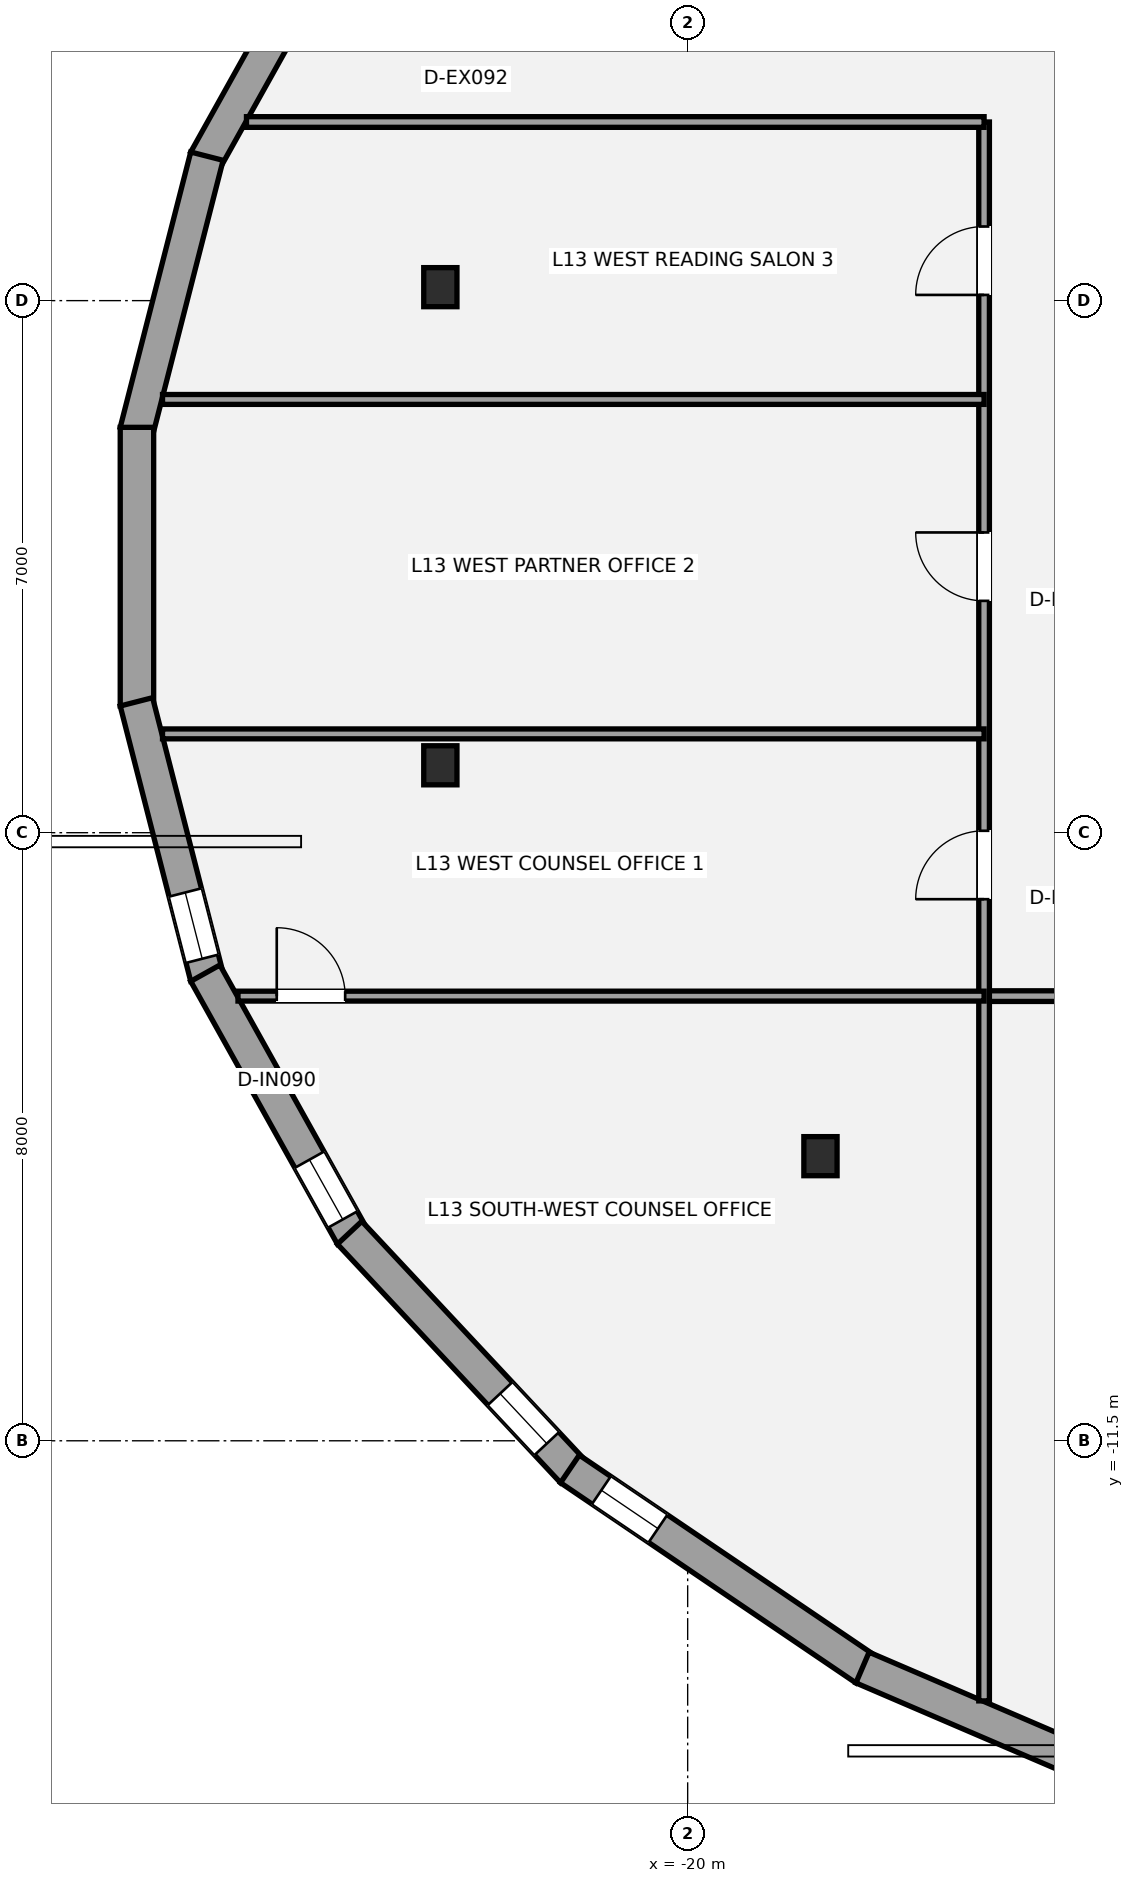
"""IFC4 building model, lengths in metres.
Left out: names, types, materials, properties, quantities, classifications, styles, units other than length and angle.
Written with IfcOpenShell. Run it as: python <this file> out.ifc"""

import sys

from ifc_helpers import new_model, si_unit, direction, frame, frame_2d, origin, origin_2d, place, context, subcontext, project, spatial, rectangle, i_section, extrude, element, fill, save


model = new_model("IFC4")
c1 = context("Model", 3, precision=1e-05, world=origin(), true_north=direction((0.0, 1.0)))
c2 = subcontext(c1, "Body", "Model", "MODEL_VIEW")
j1 = project(units=[si_unit("LENGTHUNIT", "METRE"), si_unit("PLANEANGLEUNIT", "RADIAN")], contexts=[c1])
p1 = place(None, origin())
s1 = spatial("IfcSite", under=j1, at=p1, CompositionType="ELEMENT")
p2 = place(p1, origin())
s2 = spatial("IfcBuilding", under=s1, at=p2, CompositionType="ELEMENT")
p3 = place(p2, frame((0.0, 0.0, 52.2)))
s3 = spatial("IfcBuildingStorey", under=s2, at=p3, CompositionType="ELEMENT", Elevation=52.2)
for number, where, z_axis, x_axis in (
    (1, (-23.254, 3.677, 0.0), (0.0, 0.0, 1.0), (1.0, 0.0, 0.0)),
    (2, (-23.254, -2.613, 0.0), (0.0, 0.0, 1.0), (1.0, 0.0, 0.0)),
    (3, (-18.253, -7.756, 0.0), (0.0, 0.0, 1.0), (1.0, 0.0, 0.0)),
):
    element("IfcColumn", number, at=place(p3, frame(where, z_axis=z_axis, x_axis=x_axis)), inside=s3, PredefinedType="COLUMN", context=c2, shape_type="SweptSolid", body=[
        extrude(i_section(OverallWidth=0.437, OverallDepth=0.514, WebThickness=0.061, FlangeThickness=0.097, at=origin_2d()), origin(), (0.0, 0.0, 1.0), 3.6),
    ])
p4 = place(p3, frame((-26.346, 5.348, 0.0), z_axis=(0.0, 0.0, 1.0), x_axis=(0.487369438963, 0.873195871477, 0.0)))
e4 = element("IfcWall", 4, at=p4, inside=s3, PredefinedType="STANDARD", context=c2, shape_type="SweptSolid", body=[
    extrude(rectangle(XDim=3.96, YDim=0.44, at=frame_2d((1.98, 0.0))), origin(), (0.0, 0.0, 1.0), 2.533),
])
p5 = place(p4, frame((2.761, 0.0, 0.58)))
e5 = element("IfcOpeningElement", 5, at=p5, cuts=e4, PredefinedType="OPENING", context=c2, shape_type="SweptSolid", body=[
    extrude(rectangle(XDim=0.9, YDim=1.35, at=frame_2d((0.45, 0.675))), frame((0.0, 0.23, 0.0), z_axis=(0.0, -1.0, 0.0), x_axis=(1.0, 0.0, 0.0)), (0.0, 0.0, 1.0), 0.46),
])
p6 = place(p3, frame((-27.253, 1.778, 0.0), z_axis=(0.0, 0.0, 1.0), x_axis=(0.248062710061, 0.968743976434, 0.0)))
e6 = element("IfcWall", 6, at=p6, inside=s3, PredefinedType="STANDARD", context=c2, shape_type="SweptSolid", body=[
    extrude(rectangle(XDim=3.739, YDim=0.44, at=frame_2d((1.87, 0.0))), origin(), (0.0, 0.0, 1.0), 2.533),
])
p7 = place(p3, frame((-27.246, -1.833, 0.0), z_axis=(0.0, 0.0, 1.0), x_axis=(0.0, 1.0, 0.0)))
e7 = element("IfcWall", 7, at=p7, inside=s3, PredefinedType="STANDARD", context=c2, shape_type="SweptSolid", body=[
    extrude(rectangle(XDim=3.666, YDim=0.44, at=frame_2d((1.833, 0.0))), origin(), (0.0, 0.0, 1.0), 2.533),
])
p8 = place(p3, frame((-26.325, -5.4, 0.0), z_axis=(0.0, 0.0, 1.0), x_axis=(-0.248062710061, 0.968743976434, 0.0)))
e8 = element("IfcWall", 8, at=p8, inside=s3, PredefinedType="STANDARD", context=c2, shape_type="SweptSolid", body=[
    extrude(rectangle(XDim=3.739, YDim=0.44, at=frame_2d((1.87, 0.0))), origin(), (0.0, 0.0, 1.0), 2.533),
])
p9 = place(p8, frame((0.25, 0.0, 0.42)))
e9 = element("IfcOpeningElement", 9, at=p9, cuts=e8, PredefinedType="OPENING", context=c2, shape_type="SweptSolid", body=[
    extrude(rectangle(XDim=0.9, YDim=1.35, at=frame_2d((0.45, 0.675))), frame((0.0, 0.23, 0.0), z_axis=(0.0, -1.0, 0.0), x_axis=(1.0, 0.0, 0.0)), (0.0, 0.0, 1.0), 0.46),
])
p10 = place(p3, frame((-24.416, -8.806, 0.0), z_axis=(0.0, 0.0, 1.0), x_axis=(-0.487369438963, 0.873195871477, 0.0)))
e10 = element("IfcWall", 10, at=p10, inside=s3, PredefinedType="STANDARD", context=c2, shape_type="SweptSolid", body=[
    extrude(rectangle(XDim=3.96, YDim=0.44, at=frame_2d((1.98, 0.0))), origin(), (0.0, 0.0, 1.0), 2.533),
])
p11 = place(p10, frame((0.249, 0.0, 0.92)))
e11 = element("IfcOpeningElement", 11, at=p11, cuts=e10, PredefinedType="OPENING", context=c2, shape_type="SweptSolid", body=[
    extrude(rectangle(XDim=0.9, YDim=1.35, at=frame_2d((0.45, 0.675))), frame((0.0, 0.23, 0.0), z_axis=(0.0, -1.0, 0.0), x_axis=(1.0, 0.0, 0.0)), (0.0, 0.0, 1.0), 0.46),
])
p12 = place(p3, frame((-21.512, -11.902, 0.0), z_axis=(0.0, 0.0, 1.0), x_axis=(-0.68299392258, 0.730424056093, 0.0)))
e12 = element("IfcWall", 12, at=p12, inside=s3, PredefinedType="STANDARD", context=c2, shape_type="SweptSolid", body=[
    extrude(rectangle(XDim=4.298, YDim=0.44, at=frame_2d((2.149, 0.0))), origin(), (0.0, 0.0, 1.0), 2.533),
])
p13 = place(p12, frame((0.5, 0.0, 0.58)))
e13 = element("IfcOpeningElement", 13, at=p13, cuts=e12, PredefinedType="OPENING", context=c2, shape_type="SweptSolid", body=[
    extrude(rectangle(XDim=0.9, YDim=1.35, at=frame_2d((0.45, 0.675))), frame((0.0, 0.23, 0.0), z_axis=(0.0, -1.0, 0.0), x_axis=(1.0, 0.0, 0.0)), (0.0, 0.0, 1.0), 0.46),
])
p14 = place(p3, frame((-17.663, -14.504, 0.0), z_axis=(0.0, 0.0, 1.0), x_axis=(-0.827825981515, 0.560984976919, 0.0)))
e14 = element("IfcWall", 14, at=p14, inside=s3, PredefinedType="STANDARD", context=c2, shape_type="SweptSolid", body=[
    extrude(rectangle(XDim=4.695, YDim=0.44, at=frame_2d((2.347, 0.0))), origin(), (0.0, 0.0, 1.0), 2.533),
])
p15 = place(p14, frame((3.295, 0.0, 0.58)))
e15 = element("IfcOpeningElement", 15, at=p15, cuts=e14, PredefinedType="OPENING", context=c2, shape_type="SweptSolid", body=[
    extrude(rectangle(XDim=0.9, YDim=1.35, at=frame_2d((0.45, 0.675))), frame((0.0, 0.23, 0.0), z_axis=(0.0, -1.0, 0.0), x_axis=(1.0, 0.0, 0.0)), (0.0, 0.0, 1.0), 0.46),
])
p16 = place(p3, frame((-13.067, -16.473, 0.0), z_axis=(0.0, 0.0, 1.0), x_axis=(-0.918881850071, 0.394532819433, 0.0)))
e16 = element("IfcWall", 16, at=p16, inside=s3, PredefinedType="STANDARD", context=c2, shape_type="SweptSolid", body=[
    extrude(rectangle(XDim=5.042, YDim=0.44, at=frame_2d((2.521, 0.0))), origin(), (0.0, 0.0, 1.0), 2.533),
])
p17 = place(p16, frame((0.2, 0.0, 0.58)))
e17 = element("IfcOpeningElement", 17, at=p17, cuts=e16, PredefinedType="OPENING", context=c2, shape_type="SweptSolid", body=[
    extrude(rectangle(XDim=1.4, YDim=1.55, at=frame_2d((0.7, 0.775))), frame((0.0, 0.23, 0.0), z_axis=(0.0, -1.0, 0.0), x_axis=(1.0, 0.0, 0.0)), (0.0, 0.0, 1.0), 0.46),
])
p18 = place(p3, frame((-16.1, -5.65, 0.0), z_axis=(0.0, 0.0, 1.0), x_axis=(1.0, 0.0, 0.0)))
e18 = element("IfcWall", 18, at=p18, inside=s3, PredefinedType="PARTITIONING", context=c2, shape_type="SweptSolid", body=[
    extrude(rectangle(XDim=34.1, YDim=0.14, at=frame_2d((17.05, 0.0))), origin(), (0.0, 0.0, 1.0), 3.4),
])
p19 = place(p18, frame((5.35, 0.0, 0.0)))
e19 = element("IfcOpeningElement", 19, at=p19, cuts=e18, PredefinedType="OPENING", context=c2, shape_type="SweptSolid", body=[
    extrude(rectangle(XDim=0.9, YDim=2.1, at=frame_2d((0.45, 1.05))), frame((0.0, 0.08, 0.0), z_axis=(0.0, -1.0, 0.0), x_axis=(1.0, 0.0, 0.0)), (0.0, 0.0, 1.0), 0.16),
])
p20 = place(p18, frame((15.85, 0.0, 0.0)))
e20 = element("IfcOpeningElement", 20, at=p20, cuts=e18, PredefinedType="OPENING", context=c2, shape_type="SweptSolid", body=[
    extrude(rectangle(XDim=1.5, YDim=2.15, at=frame_2d((0.75, 1.075))), frame((0.0, 0.08, 0.0), z_axis=(0.0, -1.0, 0.0), x_axis=(1.0, 0.0, 0.0)), (0.0, 0.0, 1.0), 0.16),
])
p21 = place(p18, frame((27.4, 0.0, 0.0)))
e21 = element("IfcOpeningElement", 21, at=p21, cuts=e18, PredefinedType="OPENING", context=c2, shape_type="SweptSolid", body=[
    extrude(rectangle(XDim=0.9, YDim=2.1, at=frame_2d((0.45, 1.05))), frame((0.0, 0.08, 0.0), z_axis=(0.0, -1.0, 0.0), x_axis=(1.0, 0.0, 0.0)), (0.0, 0.0, 1.0), 0.16),
])
p22 = place(p3, frame((-16.1, -14.922, 0.0), z_axis=(0.0, 0.0, 1.0), x_axis=(0.0, 1.0, 0.0)))
e22 = element("IfcWall", 22, at=p22, inside=s3, PredefinedType="PARTITIONING", context=c2, shape_type="SweptSolid", body=[
    extrude(rectangle(XDim=20.772, YDim=0.14, at=frame_2d((10.386, 0.0))), origin(), (0.0, 0.0, 1.0), 2.841),
])
p23 = place(p22, frame((10.547, 0.0, 0.0)))
e23 = element("IfcOpeningElement", 23, at=p23, cuts=e22, PredefinedType="OPENING", context=c2, shape_type="SweptSolid", body=[
    extrude(rectangle(XDim=0.9, YDim=2.1, at=frame_2d((0.45, 1.05))), frame((0.0, 0.08, 0.0), z_axis=(0.0, -1.0, 0.0), x_axis=(1.0, 0.0, 0.0)), (0.0, 0.0, 1.0), 0.16),
])
p24 = place(p22, frame((14.472, 0.0, 0.0)))
e24 = element("IfcOpeningElement", 24, at=p24, cuts=e22, PredefinedType="OPENING", context=c2, shape_type="SweptSolid", body=[
    extrude(rectangle(XDim=0.9, YDim=2.1, at=frame_2d((0.45, 1.05))), frame((0.0, 0.08, 0.0), z_axis=(0.0, -1.0, 0.0), x_axis=(1.0, 0.0, 0.0)), (0.0, 0.0, 1.0), 0.16),
])
p25 = place(p22, frame((18.497, 0.0, 0.0)))
e25 = element("IfcOpeningElement", 25, at=p25, cuts=e22, PredefinedType="OPENING", context=c2, shape_type="SweptSolid", body=[
    extrude(rectangle(XDim=0.9, YDim=2.1, at=frame_2d((0.45, 1.05))), frame((0.0, 0.08, 0.0), z_axis=(0.0, -1.0, 0.0), x_axis=(1.0, 0.0, 0.0)), (0.0, 0.0, 1.0), 0.16),
])
p26 = place(p3, frame((-25.805, 5.85, 0.0), z_axis=(0.0, 0.0, 1.0), x_axis=(1.0, 0.0, 0.0)))
e26 = element("IfcWall", 26, at=p26, inside=s3, PredefinedType="PARTITIONING", context=c2, shape_type="SweptSolid", body=[
    extrude(rectangle(XDim=9.705, YDim=0.14, at=frame_2d((4.852, 0.0))), origin(), (0.0, 0.0, 1.0), 3.4),
])
p27 = place(p3, frame((-25.917, -5.65, 0.0), z_axis=(0.0, 0.0, 1.0), x_axis=(1.0, 0.0, 0.0)))
e27 = element("IfcWall", 27, at=p27, inside=s3, PredefinedType="PARTITIONING", context=c2, shape_type="SweptSolid", body=[
    extrude(rectangle(XDim=9.816, YDim=0.13, at=frame_2d((4.908, 0.0))), origin(), (0.0, 0.0, 1.0), 2.779),
])
p28 = place(p27, frame((0.51, 0.0, 0.0)))
e28 = element("IfcOpeningElement", 28, at=p28, cuts=e27, PredefinedType="OPENING", context=c2, shape_type="SweptSolid", body=[
    extrude(rectangle(XDim=0.9, YDim=2.1, at=frame_2d((0.45, 1.05))), frame((0.0, 0.075, 0.0), z_axis=(0.0, -1.0, 0.0), x_axis=(1.0, 0.0, 0.0)), (0.0, 0.0, 1.0), 0.15),
])
for number, where, z_axis, x_axis in (
    (29, (-26.909, -2.2, 0.0), (0.0, 0.0, 1.0), (1.0, 0.0, 0.0)),
    (30, (-26.909, 2.2, 0.0), (0.0, 0.0, 1.0), (1.0, 0.0, 0.0)),
):
    element("IfcWall", number, at=place(p3, frame(where, z_axis=z_axis, x_axis=x_axis)), inside=s3, PredefinedType="PARTITIONING", context=c2, shape_type="SweptSolid", body=[
        extrude(rectangle(XDim=10.809, YDim=0.13, at=frame_2d((5.405, 0.0))), origin(), (0.0, 0.0, 1.0), 2.841),
    ])
p29 = place(p9, origin())
e31 = element("IfcWindow", 31, at=p29, inside=s3, PartitioningType="SINGLE_PANEL", PredefinedType="WINDOW", context=c2, shape_type="SweptSolid", body=[
    extrude(rectangle(XDim=0.9, YDim=1.35, at=frame_2d((0.45, 0.675))), frame((0.0, -0.01, 0.0), z_axis=(0.0, -1.0, 0.0), x_axis=(1.0, 0.0, 0.0)), (0.0, 0.0, 1.0), 0.06),
])
fill(e9, e31)
p30 = place(p11, origin())
e32 = element("IfcWindow", 32, at=p30, inside=s3, PartitioningType="SINGLE_PANEL", PredefinedType="WINDOW", context=c2, shape_type="SweptSolid", body=[
    extrude(rectangle(XDim=0.9, YDim=1.35, at=frame_2d((0.45, 0.675))), frame((0.0, -0.01, 0.0), z_axis=(0.0, -1.0, 0.0), x_axis=(1.0, 0.0, 0.0)), (0.0, 0.0, 1.0), 0.06),
])
fill(e11, e32)
p31 = place(p13, origin())
e33 = element("IfcWindow", 33, at=p31, inside=s3, PartitioningType="SINGLE_PANEL", PredefinedType="WINDOW", context=c2, shape_type="SweptSolid", body=[
    extrude(rectangle(XDim=0.9, YDim=1.35, at=frame_2d((0.45, 0.675))), frame((0.0, -0.01, 0.0), z_axis=(0.0, -1.0, 0.0), x_axis=(1.0, 0.0, 0.0)), (0.0, 0.0, 1.0), 0.06),
])
fill(e13, e33)
p32 = place(p15, origin())
e34 = element("IfcWindow", 34, at=p32, inside=s3, PartitioningType="SINGLE_PANEL", PredefinedType="WINDOW", context=c2, shape_type="SweptSolid", body=[
    extrude(rectangle(XDim=0.9, YDim=1.35, at=frame_2d((0.45, 0.675))), frame((0.0, -0.01, 0.0), z_axis=(0.0, -1.0, 0.0), x_axis=(1.0, 0.0, 0.0)), (0.0, 0.0, 1.0), 0.06),
])
fill(e15, e34)
p33 = place(p28, origin())
e35 = element("IfcDoor", 35, at=p33, inside=s3, OperationType="SINGLE_SWING_LEFT", PredefinedType="DOOR", context=c2, shape_type="SweptSolid", body=[
    extrude(rectangle(XDim=0.9, YDim=2.1, at=frame_2d((0.45, 1.05))), frame((0.0, 0.025, 0.0), z_axis=(0.0, -1.0, 0.0), x_axis=(1.0, 0.0, 0.0)), (0.0, 0.0, 1.0), 0.05),
])
fill(e28, e35)
p34 = place(p23, origin())
e36 = element("IfcDoor", 36, at=p34, inside=s3, OperationType="SINGLE_SWING_LEFT", PredefinedType="DOOR", context=c2, shape_type="SweptSolid", body=[
    extrude(rectangle(XDim=0.9, YDim=2.1, at=frame_2d((0.45, 1.05))), frame((0.0, 0.025, 0.0), z_axis=(0.0, -1.0, 0.0), x_axis=(1.0, 0.0, 0.0)), (0.0, 0.0, 1.0), 0.05),
])
fill(e23, e36)
p35 = place(p24, origin())
e37 = element("IfcDoor", 37, at=p35, inside=s3, OperationType="SINGLE_SWING_RIGHT", PredefinedType="DOOR", context=c2, shape_type="SweptSolid", body=[
    extrude(rectangle(XDim=0.9, YDim=2.1, at=frame_2d((0.45, 1.05))), frame((0.0, 0.025, 0.0), z_axis=(0.0, -1.0, 0.0), x_axis=(1.0, 0.0, 0.0)), (0.0, 0.0, 1.0), 0.05),
])
fill(e24, e37)
p36 = place(p25, origin())
e38 = element("IfcDoor", 38, at=p36, inside=s3, OperationType="SINGLE_SWING_LEFT", PredefinedType="DOOR", context=c2, shape_type="SweptSolid", body=[
    extrude(rectangle(XDim=0.9, YDim=2.1, at=frame_2d((0.45, 1.05))), frame((0.0, 0.025, 0.0), z_axis=(0.0, -1.0, 0.0), x_axis=(1.0, 0.0, 0.0)), (0.0, 0.0, 1.0), 0.05),
])
fill(e25, e38)
save(model, sys.argv[1])
